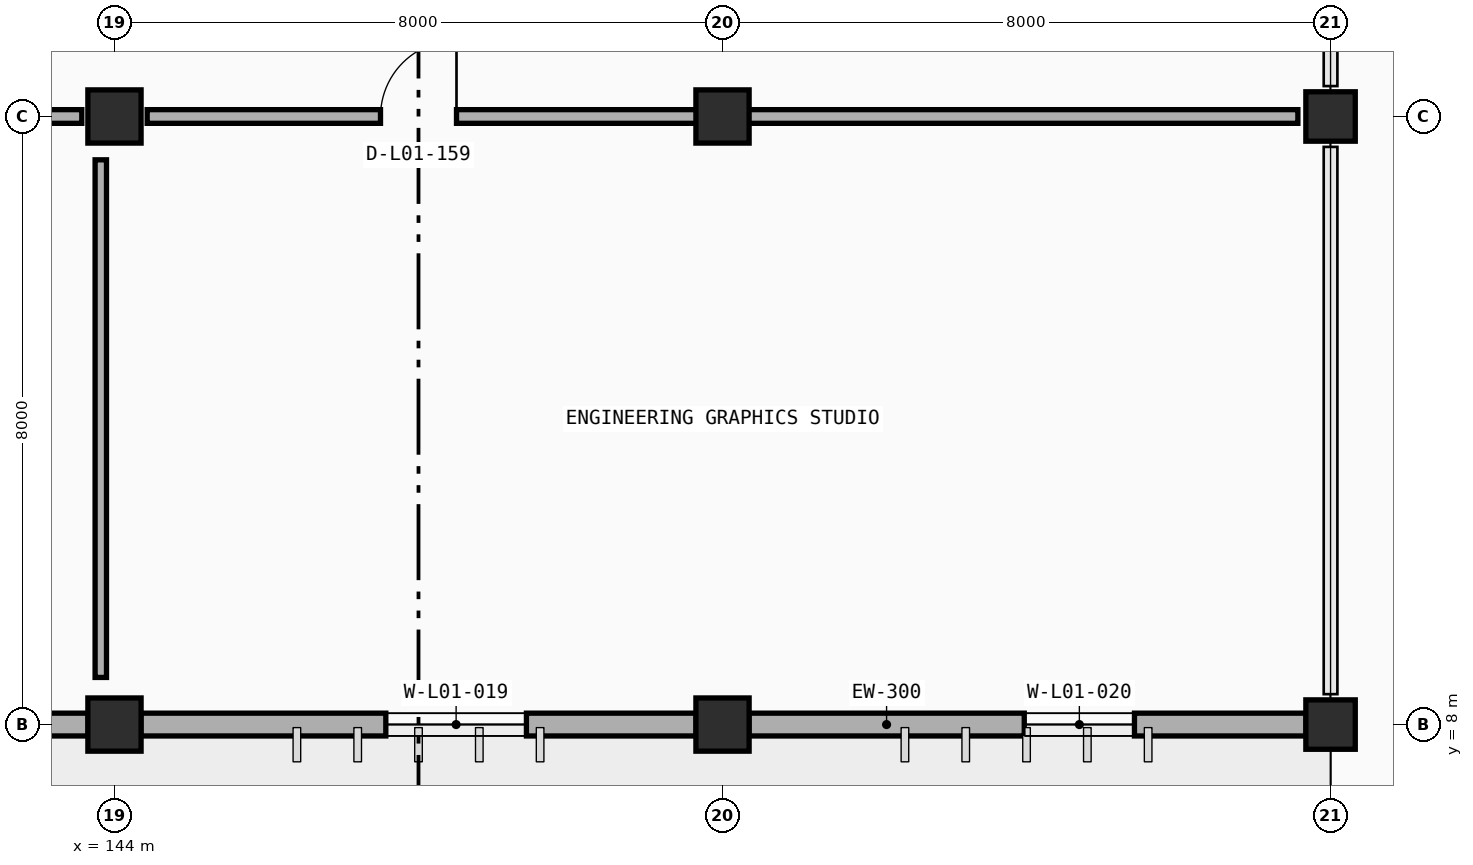
"""IFC4 building model, lengths in metres.
Left out: names, types, materials, properties, quantities, classifications, styles, units other than length and angle.
Written with IfcOpenShell. Run it as: python <this file> out.ifc"""

import sys

from ifc_helpers import new_model, si_unit, direction, frame, frame_2d, origin, origin_2d, place, context, subcontext, project, spatial, rectangle, extrude, element, fill, save


model = new_model("IFC4")
c1 = context("Model", 3, precision=1e-05, world=origin(), true_north=direction((0.0, 1.0)))
c2 = subcontext(c1, "Body", "Model", "MODEL_VIEW")
j1 = project(units=[si_unit("LENGTHUNIT", "METRE"), si_unit("PLANEANGLEUNIT", "RADIAN")], contexts=[c1])
p1 = place(None, origin())
s1 = spatial("IfcSite", under=j1, at=p1, CompositionType="ELEMENT")
p2 = place(p1, origin())
s2 = spatial("IfcBuilding", under=s1, at=p2, CompositionType="ELEMENT")
p3 = place(p2, origin())
s3 = spatial("IfcBuildingStorey", under=s2, at=p3, CompositionType="ELEMENT", Elevation=0.0)
for number, where, z_axis, x_axis in (
    (1, (144.0, 8.0, 0.0), (0.0, 0.0, 1.0), (1.0, 0.0, 0.0)),
    (2, (152.0, 8.0, 0.0), (0.0, 0.0, 1.0), (1.0, 0.0, 0.0)),
):
    element("IfcColumn", number, at=place(p3, frame(where, z_axis=z_axis, x_axis=x_axis)), inside=s3, PredefinedType="COLUMN", context=c2, shape_type="SweptSolid", body=[
        extrude(rectangle(XDim=0.7, YDim=0.7, at=origin_2d()), origin(), (0.0, 0.0, 1.0), 4.8),
    ])
p4 = place(p3, frame((160.0, 8.0, 0.0), z_axis=(0.0, 0.0, 1.0), x_axis=(1.0, 0.0, 0.0)))
e3 = element("IfcColumn", 3, at=p4, inside=s3, PredefinedType="COLUMN", context=c2, shape_type="SweptSolid", body=[
    extrude(rectangle(XDim=0.65, YDim=0.65, at=origin_2d()), origin(), (0.0, 0.0, 1.0), 4.8),
])
for number, where, z_axis, x_axis in (
    (4, (144.0, 16.0, 0.0), (0.0, 0.0, 1.0), (1.0, 0.0, 0.0)),
    (5, (152.0, 16.0, 0.0), (0.0, 0.0, 1.0), (1.0, 0.0, 0.0)),
):
    element("IfcColumn", number, at=place(p3, frame(where, z_axis=z_axis, x_axis=x_axis)), inside=s3, PredefinedType="COLUMN", context=c2, shape_type="SweptSolid", body=[
        extrude(rectangle(XDim=0.7, YDim=0.7, at=origin_2d()), origin(), (0.0, 0.0, 1.0), 4.8),
    ])
p5 = place(p3, frame((160.0, 16.0, 0.0), z_axis=(0.0, 0.0, 1.0), x_axis=(1.0, 0.0, 0.0)))
e6 = element("IfcColumn", 6, at=p5, inside=s3, PredefinedType="COLUMN", context=c2, shape_type="SweptSolid", body=[
    extrude(rectangle(XDim=0.65, YDim=0.65, at=origin_2d()), origin(), (0.0, 0.0, 1.0), 4.8),
])
p6 = place(p3, frame((143.653, 8.0, 0.0), z_axis=(0.0, 0.0, 1.0), x_axis=(-1.0, 0.0, 0.0)))
e7 = element("IfcWall", 7, at=p6, inside=s3, PredefinedType="STANDARD", context=c2, shape_type="SweptSolid", body=[
    extrude(rectangle(XDim=7.306, YDim=0.3, at=frame_2d((3.653, 0.0))), origin(), (0.0, 0.0, 1.0), 3.91),
])
p7 = place(p6, frame((2.233, 0.0, 0.9)))
e8 = element("IfcOpeningElement", 8, at=p7, cuts=e7, PredefinedType="OPENING", context=c2, shape_type="SweptSolid", body=[
    extrude(rectangle(XDim=1.65, YDim=1.25, at=frame_2d((0.825, 0.625))), frame((0.0, 0.16, 0.0), z_axis=(0.0, -1.0, 0.0), x_axis=(1.0, 0.0, 0.0)), (0.0, 0.0, 1.0), 0.32),
])
p8 = place(p3, frame((151.653, 8.0, 0.0), z_axis=(0.0, 0.0, 1.0), x_axis=(-1.0, 0.0, 0.0)))
e9 = element("IfcWall", 9, at=p8, inside=s3, PredefinedType="STANDARD", context=c2, shape_type="SweptSolid", body=[
    extrude(rectangle(XDim=7.306, YDim=0.3, at=frame_2d((3.653, 0.0))), origin(), (0.0, 0.0, 1.0), 3.91),
])
p9 = place(p8, frame((2.233, 0.0, 0.9)))
e10 = element("IfcOpeningElement", 10, at=p9, cuts=e9, PredefinedType="OPENING", context=c2, shape_type="SweptSolid", body=[
    extrude(rectangle(XDim=1.85, YDim=1.25, at=frame_2d((0.925, 0.625))), frame((0.0, 0.16, 0.0), z_axis=(0.0, -1.0, 0.0), x_axis=(1.0, 0.0, 0.0)), (0.0, 0.0, 1.0), 0.32),
])
p10 = place(p3, frame((159.678, 8.0, 0.0), z_axis=(0.0, 0.0, 1.0), x_axis=(-1.0, 0.0, 0.0)))
e11 = element("IfcWall", 11, at=p10, inside=s3, PredefinedType="STANDARD", context=c2, shape_type="SweptSolid", body=[
    extrude(rectangle(XDim=7.331, YDim=0.3, at=frame_2d((3.666, 0.0))), origin(), (0.0, 0.0, 1.0), 3.91),
])
p11 = place(p10, frame((2.258, 0.0, 0.9)))
e12 = element("IfcOpeningElement", 12, at=p11, cuts=e11, PredefinedType="OPENING", context=c2, shape_type="SweptSolid", body=[
    extrude(rectangle(XDim=1.45, YDim=1.25, at=frame_2d((0.725, 0.625))), frame((0.0, 0.16, 0.0), z_axis=(0.0, -1.0, 0.0), x_axis=(1.0, 0.0, 0.0)), (0.0, 0.0, 1.0), 0.32),
])
p12 = place(p3, frame((120.43, 16.0, 0.0), z_axis=(0.0, 0.0, 1.0), x_axis=(1.0, 0.0, 0.0)))
e13 = element("IfcWall", 13, at=p12, inside=s3, PredefinedType="PARTITIONING", context=c2, shape_type="SweptSolid", body=[
    extrude(rectangle(XDim=23.14, YDim=0.18, at=frame_2d((11.57, 0.0))), origin(), (0.0, 0.0, 1.0), 3.81),
])
p13 = place(p12, frame((2.8, 0.0, 0.0)))
e14 = element("IfcOpeningElement", 14, at=p13, cuts=e13, PredefinedType="OPENING", context=c2, shape_type="SweptSolid", body=[
    extrude(rectangle(XDim=1.54, YDim=2.2, at=frame_2d((0.77, 1.1))), frame((0.0, 0.1, 0.0), z_axis=(0.0, -1.0, 0.0), x_axis=(1.0, 0.0, 0.0)), (0.0, 0.0, 1.0), 0.2),
])
p14 = place(p3, frame((143.82, 8.62, 0.0), z_axis=(0.0, 0.0, 1.0), x_axis=(0.0, 1.0, 0.0)))
e15 = element("IfcWall", 15, at=p14, inside=s3, PredefinedType="PARTITIONING", context=c2, shape_type="SweptSolid", body=[
    extrude(rectangle(XDim=6.81, YDim=0.15, at=frame_2d((3.405, 0.0))), origin(), (0.0, 0.0, 1.0), 3.76),
])
p15 = place(p3, frame((144.43, 16.0, 0.0), z_axis=(0.0, 0.0, 1.0), x_axis=(1.0, 0.0, 0.0)))
e16 = element("IfcWall", 16, at=p15, inside=s3, PredefinedType="PARTITIONING", context=c2, shape_type="SweptSolid", body=[
    extrude(rectangle(XDim=15.14, YDim=0.18, at=frame_2d((7.57, 0.0))), origin(), (0.0, 0.0, 1.0), 3.81),
])
p16 = place(p15, frame((3.07, 0.0, 0.0)))
e17 = element("IfcOpeningElement", 17, at=p16, cuts=e16, PredefinedType="OPENING", context=c2, shape_type="SweptSolid", body=[
    extrude(rectangle(XDim=1.0, YDim=2.15, at=frame_2d((0.5, 1.075))), frame((0.0, 0.1, 0.0), z_axis=(0.0, -1.0, 0.0), x_axis=(1.0, 0.0, 0.0)), (0.0, 0.0, 1.0), 0.2),
])
p17 = place(p9, origin())
e18 = element("IfcWindow", 18, at=p17, inside=s3, PartitioningType="DOUBLE_PANEL_VERTICAL", PredefinedType="WINDOW", context=c2, shape_type="SweptSolid", body=[
    extrude(rectangle(XDim=1.85, YDim=1.25, at=frame_2d((0.925, 0.625))), frame((0.0, 0.03, 0.0), z_axis=(0.0, -1.0, 0.0), x_axis=(1.0, 0.0, 0.0)), (0.0, 0.0, 1.0), 0.06),
])
fill(e10, e18)
p18 = place(p11, origin())
e19 = element("IfcWindow", 19, at=p18, inside=s3, PartitioningType="SINGLE_PANEL", PredefinedType="WINDOW", context=c2, shape_type="SweptSolid", body=[
    extrude(rectangle(XDim=1.45, YDim=1.25, at=frame_2d((0.725, 0.625))), frame((0.0, 0.03, 0.0), z_axis=(0.0, -1.0, 0.0), x_axis=(1.0, 0.0, 0.0)), (0.0, 0.0, 1.0), 0.06),
])
fill(e12, e19)
p19 = place(p16, origin())
e20 = element("IfcDoor", 20, at=p19, inside=s3, OperationType="SINGLE_SWING_RIGHT", PredefinedType="DOOR", context=c2, shape_type="SweptSolid", body=[
    extrude(rectangle(XDim=1.0, YDim=2.15, at=frame_2d((0.5, 1.075))), frame((0.0, 0.025, 0.0), z_axis=(0.0, -1.0, 0.0), x_axis=(1.0, 0.0, 0.0)), (0.0, 0.0, 1.0), 0.05),
])
fill(e17, e20)
save(model, sys.argv[1])
